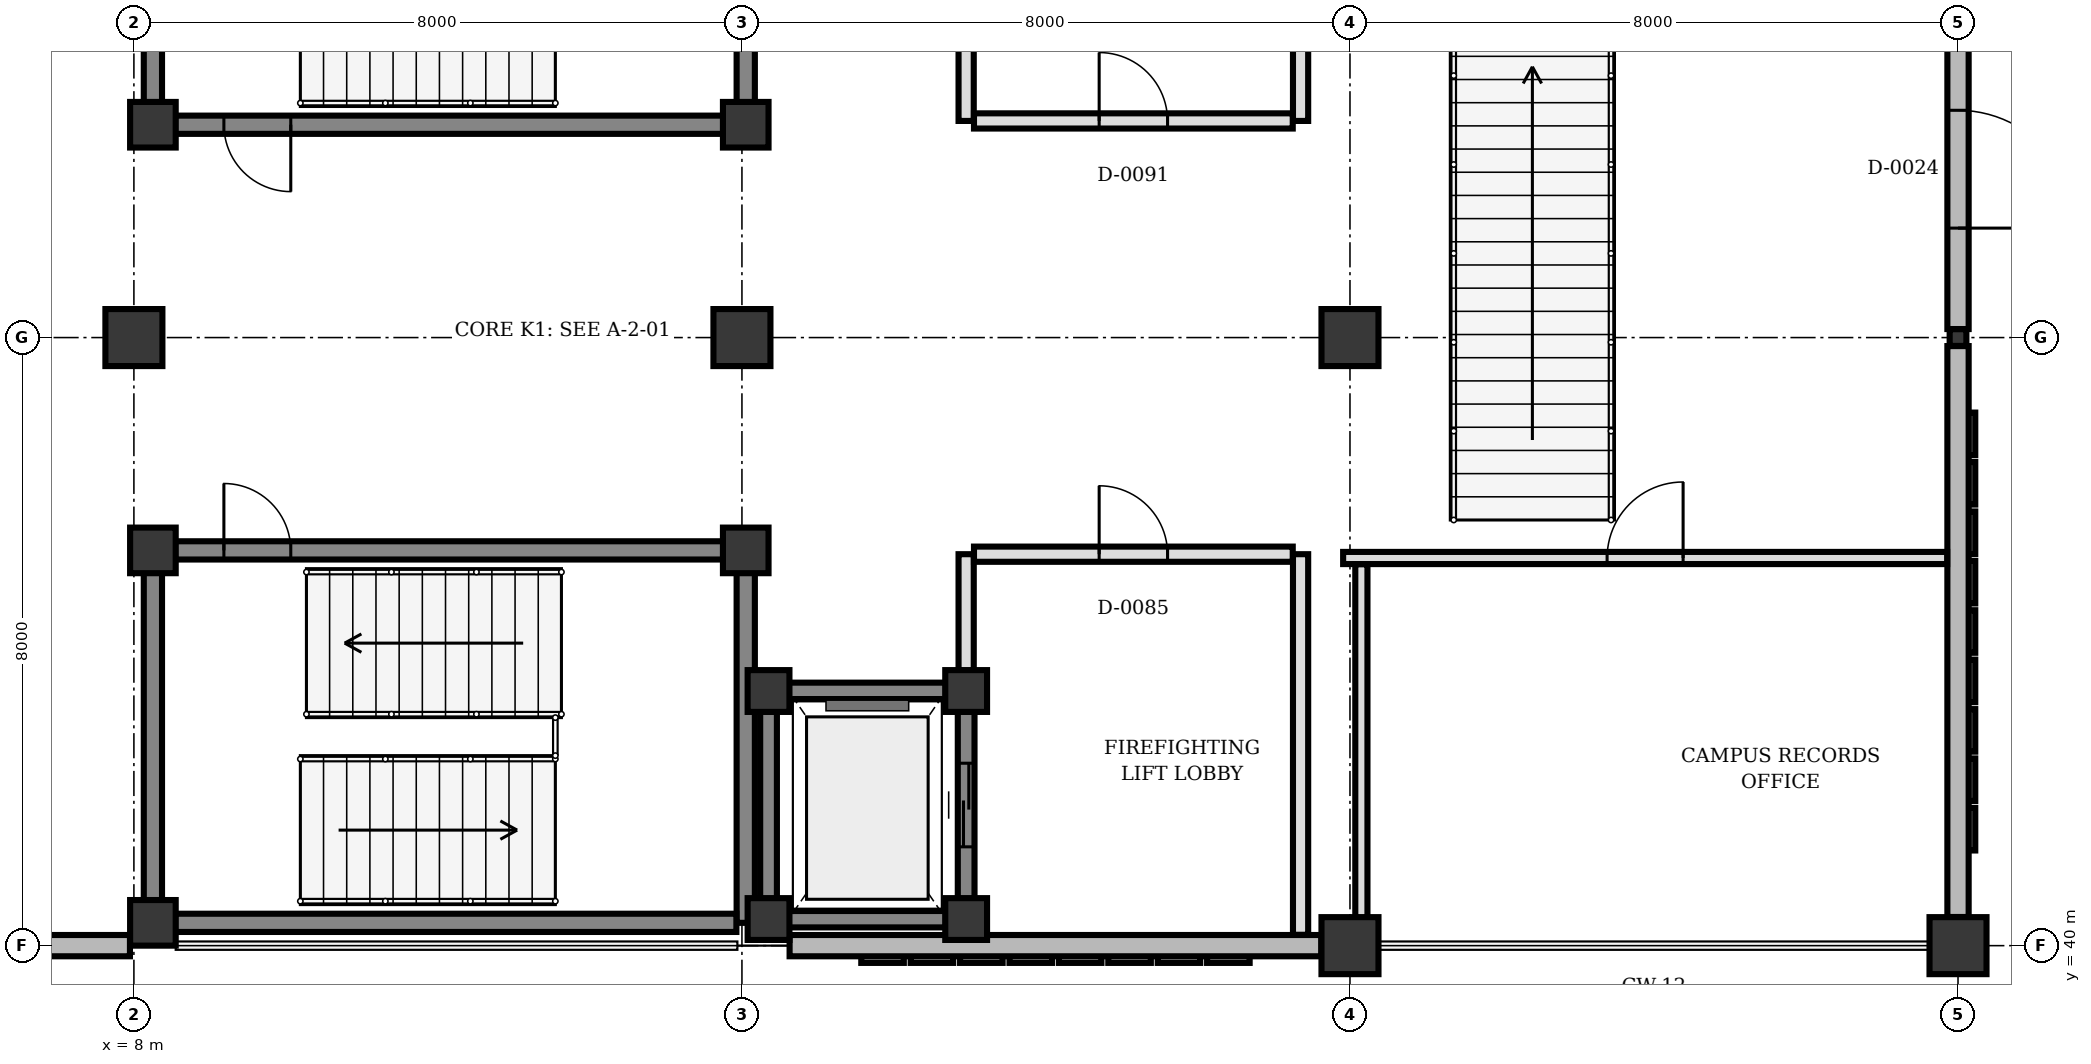
"""IFC4 building model, lengths in metres.
Left out: names, types, materials, properties, quantities, classifications, styles, units other than length and angle.
Written with IfcOpenShell. Run it as: python <this file> out.ifc"""

import sys

from ifc_helpers import new_model, si_unit, direction, frame, frame_2d, origin, origin_2d, place, context, subcontext, project, spatial, rectangle, hollow_rectangle, extrude, element, fill, save


model = new_model("IFC4")
c1 = context("Model", 3, precision=1e-05, world=origin(), true_north=direction((0.0, 1.0)))
c2 = subcontext(c1, "Body", "Model", "MODEL_VIEW")
j1 = project(units=[si_unit("LENGTHUNIT", "METRE"), si_unit("PLANEANGLEUNIT", "RADIAN")], contexts=[c1])
p1 = place(None, origin())
s1 = spatial("IfcSite", under=j1, at=p1, CompositionType="ELEMENT")
p2 = place(p1, origin())
s2 = spatial("IfcBuilding", under=s1, at=p2, CompositionType="ELEMENT")
p3 = place(p2, origin())
s3 = spatial("IfcBuildingStorey", under=s2, at=p3, CompositionType="ELEMENT", Elevation=0.0)
for number, where, z_axis, x_axis in (
    (1, (8.25, 40.3, 0.0), (0.0, 0.0, 1.0), (1.0, 0.0, 0.0)),
    (2, (16.05, 45.2, 0.0), (0.0, 0.0, 1.0), (1.0, 0.0, 0.0)),
    (3, (8.25, 45.2, 0.0), (0.0, 0.0, 1.0), (1.0, 0.0, 0.0)),
    (4, (8.25, 50.8, 0.0), (0.0, 0.0, 1.0), (1.0, 0.0, 0.0)),
    (5, (16.05, 50.8, 0.0), (0.0, 0.0, 1.0), (1.0, 0.0, 0.0)),
):
    element("IfcColumn", number, at=place(p3, frame(where, z_axis=z_axis, x_axis=x_axis)), inside=s3, PredefinedType="COLUMN", context=c2, shape_type="SweptSolid", body=[
        extrude(rectangle(XDim=0.6, YDim=0.6, at=origin_2d()), origin(), (0.0, 0.0, 1.0), 4.5),
    ])
for number, where, z_axis, x_axis in (
    (6, (16.35, 40.35, 0.0), (0.0, 0.0, 1.0), (1.0, 0.0, 0.0)),
    (7, (18.95, 40.35, 0.0), (0.0, 0.0, 1.0), (1.0, 0.0, 0.0)),
    (8, (18.95, 43.35, 0.0), (0.0, 0.0, 1.0), (1.0, 0.0, 0.0)),
    (9, (16.35, 43.35, 0.0), (0.0, 0.0, 1.0), (1.0, 0.0, 0.0)),
):
    element("IfcColumn", number, at=place(p3, frame(where, z_axis=z_axis, x_axis=x_axis)), inside=s3, PredefinedType="COLUMN", context=c2, shape_type="SweptSolid", body=[
        extrude(rectangle(XDim=0.55, YDim=0.55, at=origin_2d()), origin(), (0.0, 0.0, 1.0), 4.5),
    ])
for number, where, z_axis, x_axis in (
    (10, (16.0, 48.0, 0.0), (0.0, 0.0, 1.0), (1.0, 0.0, 0.0)),
    (11, (24.0, 40.0, 0.0), (0.0, 0.0, 1.0), (1.0, 0.0, 0.0)),
    (12, (24.0, 48.0, 0.0), (0.0, 0.0, 1.0), (1.0, 0.0, 0.0)),
    (13, (32.0, 40.0, 0.0), (0.0, 0.0, 1.0), (1.0, 0.0, 0.0)),
):
    element("IfcColumn", number, at=place(p3, frame(where, z_axis=z_axis, x_axis=x_axis)), inside=s3, PredefinedType="COLUMN", context=c2, shape_type="SweptSolid", body=[
        extrude(rectangle(XDim=0.75, YDim=0.75, at=origin_2d()), origin(), (0.0, 0.0, 1.0), 4.5),
    ])
p4 = place(p3, frame((32.0, 48.0, 0.0), z_axis=(0.0, 0.0, 1.0), x_axis=(1.0, 0.0, 0.0)))
e14 = element("IfcColumn", 14, at=p4, inside=s3, PredefinedType="COLUMN", context=c2, shape_type="SweptSolid", body=[
    extrude(hollow_rectangle(XDim=0.22, YDim=0.22, WallThickness=0.01, at=origin_2d()), origin(), (0.0, 0.0, 1.0), 4.5),
])
p5 = place(p3, frame((8.0, 48.0, 0.0), z_axis=(0.0, 0.0, 1.0), x_axis=(1.0, 0.0, 0.0)))
e15 = element("IfcColumn", 15, at=p5, inside=s3, PredefinedType="COLUMN", context=c2, shape_type="SweptSolid", body=[
    extrude(rectangle(XDim=0.75, YDim=0.75, at=origin_2d()), origin(), (0.0, 0.0, 1.0), 4.5),
])
p6 = place(p3, frame((32.0, 55.623, 0.0), z_axis=(0.0, 0.0, 1.0), x_axis=(0.0, -1.0, 0.0)))
e16 = element("IfcWall", 16, at=p6, inside=s3, PredefinedType="SOLIDWALL", context=c2, shape_type="SweptSolid", body=[
    extrude(rectangle(XDim=7.511, YDim=0.28, at=frame_2d((3.755, 0.0))), origin(), (0.0, 0.0, 1.0), 3.55),
])
p7 = place(p6, frame((4.633, 0.0, 0.0)))
e17 = element("IfcOpeningElement", 17, at=p7, cuts=e16, PredefinedType="OPENING", context=c2, shape_type="SweptSolid", body=[
    extrude(rectangle(XDim=1.55, YDim=2.2, at=frame_2d((0.775, 1.1))), frame((0.0, 0.15, 0.0), z_axis=(0.0, -1.0, 0.0), x_axis=(1.0, 0.0, 0.0)), (0.0, 0.0, 1.0), 0.3),
])
p8 = place(p3, frame((32.0, 47.888, 0.0), z_axis=(0.0, 0.0, 1.0), x_axis=(0.0, -1.0, 0.0)))
e18 = element("IfcWall", 18, at=p8, inside=s3, PredefinedType="SOLIDWALL", context=c2, shape_type="SweptSolid", body=[
    extrude(rectangle(XDim=7.511, YDim=0.28, at=frame_2d((3.755, 0.0))), origin(), (0.0, 0.0, 1.0), 3.55),
])
p9 = place(p3, frame((23.623, 40.0, 0.0), z_axis=(0.0, 0.0, 1.0), x_axis=(-1.0, 0.0, 0.0)))
e19 = element("IfcWall", 19, at=p9, inside=s3, PredefinedType="SOLIDWALL", context=c2, shape_type="SweptSolid", body=[
    extrude(rectangle(XDim=6.996, YDim=0.28, at=frame_2d((3.498, 0.0))), origin(), (0.0, 0.0, 1.0), 3.55),
])
p10 = place(p3, frame((7.948, 40.0, 0.0), z_axis=(0.0, 0.0, 1.0), x_axis=(-1.0, 0.0, 0.0)))
e20 = element("IfcWall", 20, at=p10, inside=s3, PredefinedType="SOLIDWALL", context=c2, shape_type="SweptSolid", body=[
    extrude(rectangle(XDim=7.571, YDim=0.28, at=frame_2d((3.786, 0.0))), origin(), (0.0, 0.0, 1.0), 3.55),
])
p11 = place(p10, frame((1.421, 0.0, 0.0)))
e21 = element("IfcOpeningElement", 21, at=p11, cuts=e20, PredefinedType="OPENING", context=c2, shape_type="SweptSolid", body=[
    extrude(rectangle(XDim=1.7, YDim=2.2, at=frame_2d((0.85, 1.1))), frame((0.0, 0.15, 0.0), z_axis=(0.0, -1.0, 0.0), x_axis=(1.0, 0.0, 0.0)), (0.0, 0.0, 1.0), 0.3),
])
p12 = place(p3, frame((8.25, 40.592, 0.0), z_axis=(0.0, 0.0, 1.0), x_axis=(0.0, 1.0, 0.0)))
e22 = element("IfcWall", 22, at=p12, inside=s3, PredefinedType="SHEAR", context=c2, shape_type="SweptSolid", body=[
    extrude(rectangle(XDim=4.316, YDim=0.24, at=frame_2d((2.158, 0.0))), origin(), (0.0, 0.0, 1.0), 4.24),
])
p13 = place(p3, frame((16.05, 44.908, 0.0), z_axis=(0.0, 0.0, 1.0), x_axis=(0.0, -1.0, 0.0)))
e23 = element("IfcWall", 23, at=p13, inside=s3, PredefinedType="SHEAR", context=c2, shape_type="SweptSolid", body=[
    extrude(rectangle(XDim=4.608, YDim=0.24, at=frame_2d((2.304, 0.0))), origin(), (0.0, 0.0, 1.0), 4.24),
])
p14 = place(p3, frame((15.927, 40.3, 0.0), z_axis=(0.0, 0.0, 1.0), x_axis=(-1.0, 0.0, 0.0)))
e24 = element("IfcWall", 24, at=p14, inside=s3, PredefinedType="SHEAR", context=c2, shape_type="SweptSolid", body=[
    extrude(rectangle(XDim=7.385, YDim=0.24, at=frame_2d((3.692, 0.0))), origin(), (0.0, 0.0, 1.0), 4.24),
])
p15 = place(p3, frame((8.542, 45.2, 0.0), z_axis=(0.0, 0.0, 1.0), x_axis=(1.0, 0.0, 0.0)))
e25 = element("IfcWall", 25, at=p15, inside=s3, PredefinedType="SHEAR", context=c2, shape_type="SweptSolid", body=[
    extrude(rectangle(XDim=7.216, YDim=0.24, at=frame_2d((3.608, 0.0))), origin(), (0.0, 0.0, 1.0), 4.24),
])
p16 = place(p15, frame((0.642, 0.0, 0.0)))
e26 = element("IfcOpeningElement", 26, at=p16, cuts=e25, PredefinedType="OPENING", context=c2, shape_type="SweptSolid", body=[
    extrude(rectangle(XDim=0.88, YDim=2.1, at=frame_2d((0.44, 1.05))), frame((0.0, 0.13, 0.0), z_axis=(0.0, -1.0, 0.0), x_axis=(1.0, 0.0, 0.0)), (0.0, 0.0, 1.0), 0.26),
])
p17 = place(p3, frame((8.25, 51.092, 0.0), z_axis=(0.0, 0.0, 1.0), x_axis=(0.0, 1.0, 0.0)))
e27 = element("IfcWall", 27, at=p17, inside=s3, PredefinedType="SHEAR", context=c2, shape_type="SweptSolid", body=[
    extrude(rectangle(XDim=4.316, YDim=0.24, at=frame_2d((2.158, 0.0))), origin(), (0.0, 0.0, 1.0), 4.24),
])
p18 = place(p3, frame((16.05, 55.7, 0.0), z_axis=(0.0, 0.0, 1.0), x_axis=(0.0, -1.0, 0.0)))
e28 = element("IfcWall", 28, at=p18, inside=s3, PredefinedType="SHEAR", context=c2, shape_type="SweptSolid", body=[
    extrude(rectangle(XDim=4.608, YDim=0.24, at=frame_2d((2.304, 0.0))), origin(), (0.0, 0.0, 1.0), 4.24),
])
p19 = place(p3, frame((15.758, 50.8, 0.0), z_axis=(0.0, 0.0, 1.0), x_axis=(-1.0, 0.0, 0.0)))
e29 = element("IfcWall", 29, at=p19, inside=s3, PredefinedType="SHEAR", context=c2, shape_type="SweptSolid", body=[
    extrude(rectangle(XDim=7.216, YDim=0.24, at=frame_2d((3.608, 0.0))), origin(), (0.0, 0.0, 1.0), 4.24),
])
p20 = place(p19, frame((5.694, 0.0, 0.0)))
e30 = element("IfcOpeningElement", 30, at=p20, cuts=e29, PredefinedType="OPENING", context=c2, shape_type="SweptSolid", body=[
    extrude(rectangle(XDim=0.88, YDim=2.1, at=frame_2d((0.44, 1.05))), frame((0.0, 0.13, 0.0), z_axis=(0.0, -1.0, 0.0), x_axis=(1.0, 0.0, 0.0)), (0.0, 0.0, 1.0), 0.26),
])
p21 = place(p3, frame((16.617, 40.35, 0.0), z_axis=(0.0, 0.0, 1.0), x_axis=(1.0, 0.0, 0.0)))
e31 = element("IfcWall", 31, at=p21, inside=s3, PredefinedType="SHEAR", context=c2, shape_type="SweptSolid", body=[
    extrude(rectangle(XDim=2.066, YDim=0.22, at=frame_2d((1.033, 0.0))), origin(), (0.0, 0.0, 1.0), 4.24),
])
p22 = place(p3, frame((18.95, 40.617, 0.0), z_axis=(0.0, 0.0, 1.0), x_axis=(0.0, 1.0, 0.0)))
e32 = element("IfcWall", 32, at=p22, inside=s3, PredefinedType="SHEAR", context=c2, shape_type="SweptSolid", body=[
    extrude(rectangle(XDim=2.466, YDim=0.22, at=frame_2d((1.233, 0.0))), origin(), (0.0, 0.0, 1.0), 4.24),
])
p23 = place(p22, frame((0.683, 0.0, 0.0)))
e33 = element("IfcOpeningElement", 33, at=p23, cuts=e32, PredefinedType="OPENING", context=c2, shape_type="SweptSolid", body=[
    extrude(rectangle(XDim=1.1, YDim=2.15, at=frame_2d((0.55, 1.075))), frame((0.0, 0.12, 0.0), z_axis=(0.0, -1.0, 0.0), x_axis=(1.0, 0.0, 0.0)), (0.0, 0.0, 1.0), 0.24),
])
p24 = place(p3, frame((18.683, 43.35, 0.0), z_axis=(0.0, 0.0, 1.0), x_axis=(-1.0, 0.0, 0.0)))
e34 = element("IfcWall", 34, at=p24, inside=s3, PredefinedType="SHEAR", context=c2, shape_type="SweptSolid", body=[
    extrude(rectangle(XDim=2.066, YDim=0.22, at=frame_2d((1.033, 0.0))), origin(), (0.0, 0.0, 1.0), 4.24),
])
p25 = place(p3, frame((16.35, 43.083, 0.0), z_axis=(0.0, 0.0, 1.0), x_axis=(0.0, -1.0, 0.0)))
e35 = element("IfcWall", 35, at=p25, inside=s3, PredefinedType="SHEAR", context=c2, shape_type="SweptSolid", body=[
    extrude(rectangle(XDim=2.466, YDim=0.22, at=frame_2d((1.233, 0.0))), origin(), (0.0, 0.0, 1.0), 4.24),
])
p26 = place(p3, frame((18.95, 43.617, 0.0), z_axis=(0.0, 0.0, 1.0), x_axis=(0.0, 1.0, 0.0)))
e36 = element("IfcWall", 36, at=p26, inside=s3, PredefinedType="PARTITIONING", context=c2, shape_type="SweptSolid", body=[
    extrude(rectangle(XDim=1.533, YDim=0.2, at=frame_2d((0.767, 0.0))), origin(), (0.0, 0.0, 1.0), 4.2),
])
p27 = place(p3, frame((23.35, 40.143, 0.0), z_axis=(0.0, 0.0, 1.0), x_axis=(0.0, 1.0, 0.0)))
e37 = element("IfcWall", 37, at=p27, inside=s3, PredefinedType="PARTITIONING", context=c2, shape_type="SweptSolid", body=[
    extrude(rectangle(XDim=5.007, YDim=0.2, at=frame_2d((2.503, 0.0))), origin(), (0.0, 0.0, 1.0), 4.2),
])
p28 = place(p3, frame((19.053, 45.15, 0.0), z_axis=(0.0, 0.0, 1.0), x_axis=(1.0, 0.0, 0.0)))
e38 = element("IfcWall", 38, at=p28, inside=s3, PredefinedType="PARTITIONING", context=c2, shape_type="SweptSolid", body=[
    extrude(rectangle(XDim=4.194, YDim=0.2, at=frame_2d((2.097, 0.0))), origin(), (0.0, 0.0, 1.0), 4.2),
])
p29 = place(p28, frame((1.647, 0.0, 0.0)))
e39 = element("IfcOpeningElement", 39, at=p29, cuts=e38, PredefinedType="OPENING", context=c2, shape_type="SweptSolid", body=[
    extrude(rectangle(XDim=0.9, YDim=2.2, at=frame_2d((0.45, 1.1))), frame((0.0, 0.11, 0.0), z_axis=(0.0, -1.0, 0.0), x_axis=(1.0, 0.0, 0.0)), (0.0, 0.0, 1.0), 0.22),
])
p30 = place(p3, frame((18.95, 50.85, 0.0), z_axis=(0.0, 0.0, 1.0), x_axis=(0.0, 1.0, 0.0)))
e40 = element("IfcWall", 40, at=p30, inside=s3, PredefinedType="PARTITIONING", context=c2, shape_type="SweptSolid", body=[
    extrude(rectangle(XDim=1.533, YDim=0.2, at=frame_2d((0.767, 0.0))), origin(), (0.0, 0.0, 1.0), 4.2),
])
p31 = place(p3, frame((23.35, 50.85, 0.0), z_axis=(0.0, 0.0, 1.0), x_axis=(0.0, 1.0, 0.0)))
e41 = element("IfcWall", 41, at=p31, inside=s3, PredefinedType="PARTITIONING", context=c2, shape_type="SweptSolid", body=[
    extrude(rectangle(XDim=4.8, YDim=0.2, at=frame_2d((2.4, 0.0))), origin(), (0.0, 0.0, 1.0), 4.2),
])
p32 = place(p3, frame((19.053, 50.85, 0.0), z_axis=(0.0, 0.0, 1.0), x_axis=(1.0, 0.0, 0.0)))
e42 = element("IfcWall", 42, at=p32, inside=s3, PredefinedType="PARTITIONING", context=c2, shape_type="SweptSolid", body=[
    extrude(rectangle(XDim=4.194, YDim=0.2, at=frame_2d((2.097, 0.0))), origin(), (0.0, 0.0, 1.0), 4.2),
])
p33 = place(p32, frame((1.647, 0.0, 0.0)))
e43 = element("IfcOpeningElement", 43, at=p33, cuts=e42, PredefinedType="OPENING", context=c2, shape_type="SweptSolid", body=[
    extrude(rectangle(XDim=0.9, YDim=2.2, at=frame_2d((0.45, 1.1))), frame((0.0, 0.11, 0.0), z_axis=(0.0, -1.0, 0.0), x_axis=(1.0, 0.0, 0.0)), (0.0, 0.0, 1.0), 0.22),
])
p34 = place(p3, frame((23.91, 45.1, 0.0), z_axis=(0.0, 0.0, 1.0), x_axis=(1.0, 0.0, 0.0)))
e44 = element("IfcWall", 44, at=p34, inside=s3, PredefinedType="PARTITIONING", context=c2, shape_type="SweptSolid", body=[
    extrude(rectangle(XDim=7.947, YDim=0.16, at=frame_2d((3.974, 0.0))), origin(), (0.0, 0.0, 1.0), 3.532),
])
p35 = place(p34, frame((3.473, 0.0, 0.0)))
e45 = element("IfcOpeningElement", 45, at=p35, cuts=e44, PredefinedType="OPENING", context=c2, shape_type="SweptSolid", body=[
    extrude(rectangle(XDim=1.0, YDim=2.1, at=frame_2d((0.5, 1.05))), frame((0.0, 0.09, 0.0), z_axis=(0.0, -1.0, 0.0), x_axis=(1.0, 0.0, 0.0)), (0.0, 0.0, 1.0), 0.18),
])
p36 = place(p3, frame((24.15, 40.367, 0.0), z_axis=(0.0, 0.0, 1.0), x_axis=(0.0, 1.0, 0.0)))
e46 = element("IfcWall", 46, at=p36, inside=s3, PredefinedType="PARTITIONING", context=c2, shape_type="SweptSolid", body=[
    extrude(rectangle(XDim=4.65, YDim=0.16, at=frame_2d((2.325, 0.0))), origin(), (0.0, 0.0, 1.0), 3.532),
])
p37 = place(p7, origin())
e47 = element("IfcDoor", 47, at=p37, inside=s3, OperationType="SINGLE_SWING_RIGHT", PredefinedType="DOOR", context=c2, shape_type="SweptSolid", body=[
    extrude(rectangle(XDim=1.55, YDim=2.2, at=frame_2d((0.775, 1.1))), frame((0.0, 0.025, 0.0), z_axis=(0.0, -1.0, 0.0), x_axis=(1.0, 0.0, 0.0)), (0.0, 0.0, 1.0), 0.05),
])
fill(e17, e47)
p38 = place(p16, origin())
e48 = element("IfcDoor", 48, at=p38, inside=s3, OperationType="SINGLE_SWING_LEFT", PredefinedType="DOOR", context=c2, shape_type="SweptSolid", body=[
    extrude(rectangle(XDim=0.88, YDim=2.1, at=frame_2d((0.44, 1.05))), frame((0.0, 0.025, 0.0), z_axis=(0.0, -1.0, 0.0), x_axis=(1.0, 0.0, 0.0)), (0.0, 0.0, 1.0), 0.05),
])
fill(e26, e48)
p39 = place(p20, origin())
e49 = element("IfcDoor", 49, at=p39, inside=s3, OperationType="SINGLE_SWING_LEFT", PredefinedType="DOOR", context=c2, shape_type="SweptSolid", body=[
    extrude(rectangle(XDim=0.88, YDim=2.1, at=frame_2d((0.44, 1.05))), frame((0.0, 0.025, 0.0), z_axis=(0.0, -1.0, 0.0), x_axis=(1.0, 0.0, 0.0)), (0.0, 0.0, 1.0), 0.05),
])
fill(e30, e49)
p40 = place(p23, origin())
e50 = element("IfcDoor", 50, at=p40, inside=s3, OperationType="DOUBLE_DOOR_SLIDING", PredefinedType="DOOR", context=c2, shape_type="SweptSolid", body=[
    extrude(rectangle(XDim=1.1, YDim=2.15, at=frame_2d((0.55, 1.075))), frame((0.0, 0.025, 0.0), z_axis=(0.0, -1.0, 0.0), x_axis=(1.0, 0.0, 0.0)), (0.0, 0.0, 1.0), 0.05),
])
fill(e33, e50)
p41 = place(p29, origin())
e51 = element("IfcDoor", 51, at=p41, inside=s3, OperationType="SINGLE_SWING_LEFT", PredefinedType="DOOR", context=c2, shape_type="SweptSolid", body=[
    extrude(rectangle(XDim=0.9, YDim=2.2, at=frame_2d((0.45, 1.1))), frame((0.0, 0.025, 0.0), z_axis=(0.0, -1.0, 0.0), x_axis=(1.0, 0.0, 0.0)), (0.0, 0.0, 1.0), 0.05),
])
fill(e39, e51)
p42 = place(p33, origin())
e52 = element("IfcDoor", 52, at=p42, inside=s3, OperationType="SINGLE_SWING_LEFT", PredefinedType="DOOR", context=c2, shape_type="SweptSolid", body=[
    extrude(rectangle(XDim=0.9, YDim=2.2, at=frame_2d((0.45, 1.1))), frame((0.0, 0.025, 0.0), z_axis=(0.0, -1.0, 0.0), x_axis=(1.0, 0.0, 0.0)), (0.0, 0.0, 1.0), 0.05),
])
fill(e43, e52)
p43 = place(p35, origin())
e53 = element("IfcDoor", 53, at=p43, inside=s3, OperationType="SINGLE_SWING_RIGHT", PredefinedType="DOOR", context=c2, shape_type="SweptSolid", body=[
    extrude(rectangle(XDim=1.0, YDim=2.1, at=frame_2d((0.5, 1.05))), frame((0.0, 0.025, 0.0), z_axis=(0.0, -1.0, 0.0), x_axis=(1.0, 0.0, 0.0)), (0.0, 0.0, 1.0), 0.05),
])
fill(e45, e53)
save(model, sys.argv[1])
